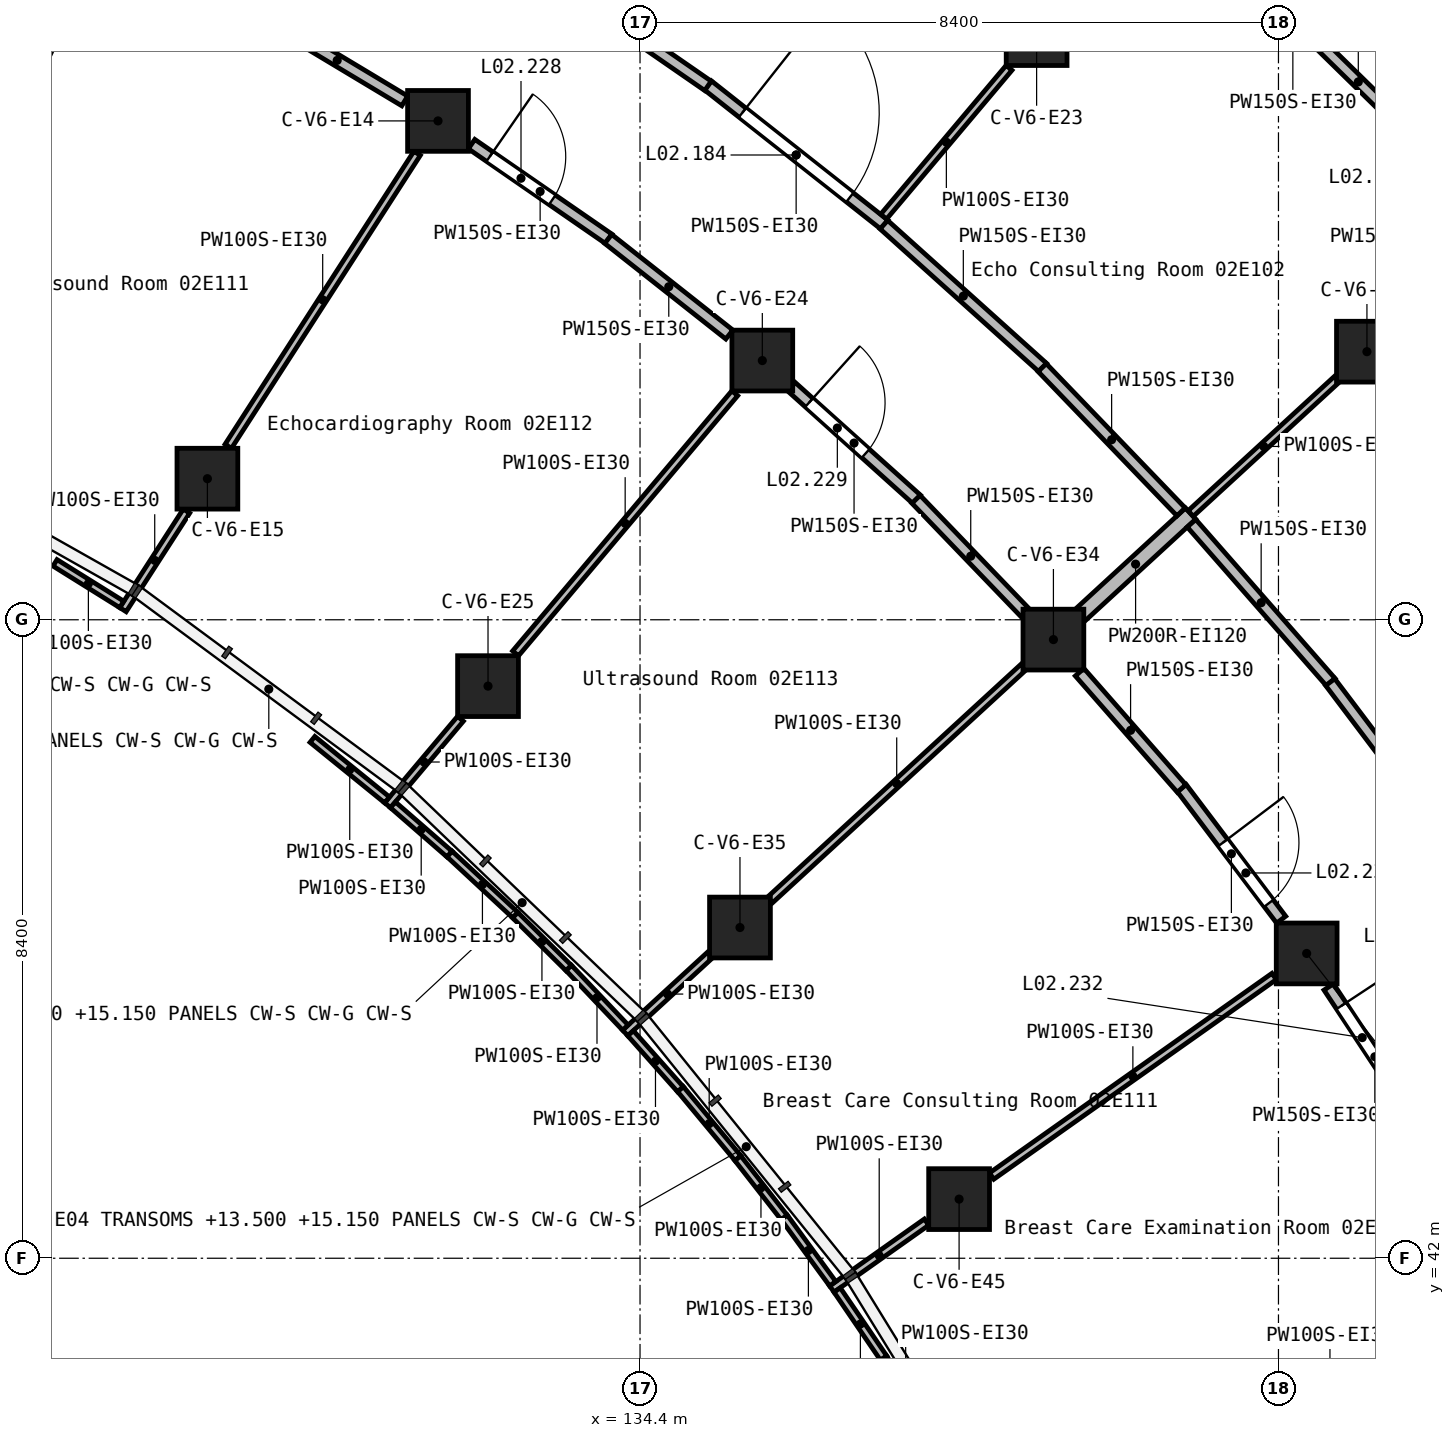
"""IFC4 building model, lengths in metres.
Left out: names, types, materials, properties, quantities, classifications, styles, units other than length and angle.
Written with IfcOpenShell. Run it as: python <this file> out.ifc"""

import sys

from ifc_helpers import new_model, si_unit, direction, frame, frame_2d, origin, origin_2d, place, context, subcontext, project, spatial, rectangle, extrude, element, fill, save


model = new_model("IFC4")
c1 = context("Model", 3, precision=1e-05, world=origin(), true_north=direction((0.0, 1.0)))
c2 = subcontext(c1, "Body", "Model", "MODEL_VIEW")
j1 = project(units=[si_unit("LENGTHUNIT", "METRE"), si_unit("PLANEANGLEUNIT", "RADIAN")], contexts=[c1])
p1 = place(None, origin())
s1 = spatial("IfcSite", under=j1, at=p1, CompositionType="ELEMENT")
p2 = place(p1, origin())
s2 = spatial("IfcBuilding", under=s1, at=p2, CompositionType="ELEMENT")
p3 = place(p2, frame((0.0, 0.0, 12.6)))
s3 = spatial("IfcBuildingStorey", under=s2, at=p3, CompositionType="ELEMENT", Elevation=12.6)
for number, where, z_axis, x_axis in (
    (1, (128.708, 52.256, 0.0), (0.0, 0.0, 1.0), (1.0, 0.0, 0.0)),
    (2, (131.742, 56.963, 0.0), (0.0, 0.0, 1.0), (1.0, 0.0, 0.0)),
    (3, (132.4, 49.527, 0.0), (0.0, 0.0, 1.0), (1.0, 0.0, 0.0)),
    (4, (135.715, 46.351, 0.0), (0.0, 0.0, 1.0), (1.0, 0.0, 0.0)),
    (5, (136.009, 53.81, 0.0), (0.0, 0.0, 1.0), (1.0, 0.0, 0.0)),
    (6, (138.598, 42.778, 0.0), (0.0, 0.0, 1.0), (1.0, 0.0, 0.0)),
    (7, (139.618, 58.092, 0.0), (0.0, 0.0, 1.0), (1.0, 0.0, 0.0)),
    (8, (139.839, 50.139, 0.0), (0.0, 0.0, 1.0), (1.0, 0.0, 0.0)),
    (9, (143.171, 46.01, 0.0), (0.0, 0.0, 1.0), (1.0, 0.0, 0.0)),
    (10, (143.964, 53.927, 0.0), (0.0, 0.0, 1.0), (1.0, 0.0, 0.0)),
):
    element("IfcColumn", number, at=place(p3, frame(where, z_axis=z_axis, x_axis=x_axis)), inside=s3, PredefinedType="COLUMN", context=c2, shape_type="SweptSolid", body=[
        extrude(rectangle(XDim=0.8, YDim=0.8, at=origin_2d()), origin(), (0.0, 0.0, 1.0), 4.2),
    ])
p4 = place(p3, frame((140.196, 50.467, 0.0), z_axis=(0.0, 0.0, 1.0), x_axis=(0.736519787736, 0.676415997943, 0.0)))
e11 = element("IfcWall", 11, at=p4, inside=s3, PredefinedType="SOLIDWALL", context=c2, shape_type="SweptSolid", body=[
    extrude(rectangle(XDim=1.966, YDim=0.2, at=frame_2d((0.983, 0.0))), origin(), (0.0, 0.0, 1.0), 3.85),
])
p5 = place(p3, frame((135.293, 57.43, 0.0), z_axis=(0.0, 0.0, 1.0), x_axis=(0.785039104315, -0.619446208073, 0.0)))
e12 = element("IfcWall", 12, at=p5, inside=s3, PredefinedType="PARTITIONING", context=c2, shape_type="SweptSolid", body=[
    extrude(rectangle(XDim=2.958, YDim=0.15, at=frame_2d((1.479, 0.0))), origin(), (0.0, 0.0, 1.0), 3.85),
])
p6 = place(p5, frame((0.579, 0.0, 0.0)))
e13 = element("IfcOpeningElement", 13, at=p6, cuts=e12, PredefinedType="OPENING", context=c2, shape_type="SweptSolid", body=[
    extrude(rectangle(XDim=1.8, YDim=2.1, at=frame_2d((0.9, 1.05))), frame((0.0, 0.085, 0.0), z_axis=(0.0, -1.0, 0.0), x_axis=(1.0, 0.0, 0.0)), (0.0, 0.0, 1.0), 0.17),
])
p7 = place(p3, frame((141.656, 51.669, 0.0), z_axis=(0.0, 0.0, 1.0), x_axis=(0.659076402407, -0.752075990702, 0.0)))
e14 = element("IfcWall", 14, at=p7, inside=s3, PredefinedType="PARTITIONING", context=c2, shape_type="SweptSolid", body=[
    extrude(rectangle(XDim=2.78, YDim=0.15, at=frame_2d((1.39, 0.0))), origin(), (0.0, 0.0, 1.0), 3.85),
])
p8 = place(p3, frame((137.608, 55.598, 0.0), z_axis=(0.0, 0.0, 1.0), x_axis=(0.743501368773, -0.668734412628, 0.0)))
e15 = element("IfcWall", 15, at=p8, inside=s3, PredefinedType="PARTITIONING", context=c2, shape_type="SweptSolid", body=[
    extrude(rectangle(XDim=2.812, YDim=0.15, at=frame_2d((1.406, 0.0))), origin(), (0.0, 0.0, 1.0), 3.85),
])
for number, where, z_axis, x_axis in (
    (16, (133.101, 58.94, 0.0), (0.0, 0.0, 1.0), (0.823, -0.569, 0.0)),
    (17, (143.481, 49.579, 0.0), (0.0, 0.0, 1.0), (0.603, -0.798, 0.0)),
):
    element("IfcWall", number, at=place(p3, frame(where, z_axis=z_axis, x_axis=x_axis)), inside=s3, PredefinedType="PARTITIONING", context=c2, shape_type="SweptSolid", body=[
        extrude(rectangle(XDim=2.666, YDim=0.15, at=frame_2d((1.333, 0.0))), origin(), (0.0, 0.0, 1.0), 3.85),
    ])
p9 = place(p3, frame((139.691, 53.718, 0.0), z_axis=(0.0, 0.0, 1.0), x_axis=(0.693447550136, -0.720507109757, 0.0)))
e18 = element("IfcWall", 18, at=p9, inside=s3, PredefinedType="PARTITIONING", context=c2, shape_type="SweptSolid", body=[
    extrude(rectangle(XDim=2.635, YDim=0.15, at=frame_2d((1.317, 0.0))), origin(), (0.0, 0.0, 1.0), 3.85),
])
p10 = place(p3, frame((136.393, 53.465, 0.0), z_axis=(0.0, 0.0, 1.0), x_axis=(0.743617683722, -0.668605070618, 0.0)))
e19 = element("IfcWall", 19, at=p10, inside=s3, PredefinedType="PARTITIONING", context=c2, shape_type="SweptSolid", body=[
    extrude(rectangle(XDim=2.213, YDim=0.15, at=frame_2d((1.106, 0.0))), origin(), (0.0, 0.0, 1.0), 3.85),
])
p11 = place(p10, frame((0.311, 0.0, 0.0)))
e20 = element("IfcOpeningElement", 20, at=p11, cuts=e19, PredefinedType="OPENING", context=c2, shape_type="SweptSolid", body=[
    extrude(rectangle(XDim=1.0, YDim=2.1, at=frame_2d((0.5, 1.05))), frame((0.0, 0.085, 0.0), z_axis=(0.0, -1.0, 0.0), x_axis=(1.0, 0.0, 0.0)), (0.0, 0.0, 1.0), 0.17),
])
p12 = place(p3, frame((132.184, 56.658, 0.0), z_axis=(0.0, 0.0, 1.0), x_axis=(0.82273696549, -0.568422277551, 0.0)))
e21 = element("IfcWall", 21, at=p12, inside=s3, PredefinedType="PARTITIONING", context=c2, shape_type="SweptSolid", body=[
    extrude(rectangle(XDim=2.193, YDim=0.15, at=frame_2d((1.096, 0.0))), origin(), (0.0, 0.0, 1.0), 3.85),
])
p13 = place(p12, frame((0.29, 0.0, 0.0)))
e22 = element("IfcOpeningElement", 22, at=p13, cuts=e21, PredefinedType="OPENING", context=c2, shape_type="SweptSolid", body=[
    extrude(rectangle(XDim=1.0, YDim=2.1, at=frame_2d((0.5, 1.05))), frame((0.0, 0.085, 0.0), z_axis=(0.0, -1.0, 0.0), x_axis=(1.0, 0.0, 0.0)), (0.0, 0.0, 1.0), 0.17),
])
p14 = place(p3, frame((141.526, 48.188, 0.0), z_axis=(0.0, 0.0, 1.0), x_axis=(0.60280129331, -0.797891346477, 0.0)))
e23 = element("IfcWall", 23, at=p14, inside=s3, PredefinedType="PARTITIONING", context=c2, shape_type="SweptSolid", body=[
    extrude(rectangle(XDim=2.172, YDim=0.15, at=frame_2d((1.086, 0.0))), origin(), (0.0, 0.0, 1.0), 3.85),
])
p15 = place(p14, frame((0.902, 0.0, 0.0)))
e24 = element("IfcOpeningElement", 24, at=p15, cuts=e23, PredefinedType="OPENING", context=c2, shape_type="SweptSolid", body=[
    extrude(rectangle(XDim=1.0, YDim=2.1, at=frame_2d((0.5, 1.05))), frame((0.0, 0.085, 0.0), z_axis=(0.0, -1.0, 0.0), x_axis=(1.0, 0.0, 0.0)), (0.0, 0.0, 1.0), 0.17),
])
p16 = place(p3, frame((143.462, 45.57, 0.0), z_axis=(0.0, 0.0, 1.0), x_axis=(0.550880835548, -0.834583911315, 0.0)))
e25 = element("IfcWall", 25, at=p16, inside=s3, PredefinedType="PARTITIONING", context=c2, shape_type="SweptSolid", body=[
    extrude(rectangle(XDim=2.201, YDim=0.15, at=frame_2d((1.101, 0.0))), origin(), (0.0, 0.0, 1.0), 3.85),
])
p17 = place(p16, frame((0.299, 0.0, 0.0)))
e26 = element("IfcOpeningElement", 26, at=p17, cuts=e25, PredefinedType="OPENING", context=c2, shape_type="SweptSolid", body=[
    extrude(rectangle(XDim=1.0, YDim=2.1, at=frame_2d((0.5, 1.05))), frame((0.0, 0.085, 0.0), z_axis=(0.0, -1.0, 0.0), x_axis=(1.0, 0.0, 0.0)), (0.0, 0.0, 1.0), 0.17),
])
p18 = place(p3, frame((133.981, 55.41, 0.0), z_axis=(0.0, 0.0, 1.0), x_axis=(0.784968928218, -0.619535133574, 0.0)))
e27 = element("IfcWall", 27, at=p18, inside=s3, PredefinedType="PARTITIONING", context=c2, shape_type="SweptSolid", body=[
    extrude(rectangle(XDim=2.031, YDim=0.15, at=frame_2d((1.015, 0.0))), origin(), (0.0, 0.0, 1.0), 3.85),
])
p19 = place(p3, frame((129.527, 58.293, 0.0), z_axis=(0.0, 0.0, 1.0), x_axis=(0.8573370195, -0.514755509922, 0.0)))
e28 = element("IfcWall", 28, at=p19, inside=s3, PredefinedType="PARTITIONING", context=c2, shape_type="SweptSolid", body=[
    extrude(rectangle(XDim=2.073, YDim=0.15, at=frame_2d((1.037, 0.0))), origin(), (0.0, 0.0, 1.0), 3.85),
])
p20 = place(p3, frame((140.184, 49.71, 0.0), z_axis=(0.0, 0.0, 1.0), x_axis=(0.659209376091, -0.751959439381, 0.0)))
e29 = element("IfcWall", 29, at=p20, inside=s3, PredefinedType="PARTITIONING", context=c2, shape_type="SweptSolid", body=[
    extrude(rectangle(XDim=2.035, YDim=0.15, at=frame_2d((1.017, 0.0))), origin(), (0.0, 0.0, 1.0), 3.85),
])
p21 = place(p3, frame((138.031, 51.985, 0.0), z_axis=(0.0, 0.0, 1.0), x_axis=(0.693216793474, -0.7207291289, 0.0)))
e30 = element("IfcWall", 30, at=p21, inside=s3, PredefinedType="PARTITIONING", context=c2, shape_type="SweptSolid", body=[
    extrude(rectangle(XDim=2.076, YDim=0.15, at=frame_2d((1.038, 0.0))), origin(), (0.0, 0.0, 1.0), 3.85),
])
p22 = place(p3, frame((143.292, 58.022, 0.0), z_axis=(0.0, 0.0, 1.0), x_axis=(0.714415993139, -0.699721222164, 0.0)))
e31 = element("IfcWall", 31, at=p22, inside=s3, PredefinedType="PARTITIONING", context=c2, shape_type="SweptSolid", body=[
    extrude(rectangle(XDim=1.562, YDim=0.15, at=frame_2d((0.781, 0.0))), origin(), (0.0, 0.0, 1.0), 3.85),
])
p23 = place(p3, frame((131.079, 47.96, 0.0), z_axis=(0.0, 0.0, 1.0), x_axis=(0.644403525256, 0.764685619479, 0.0)))
e32 = element("IfcWall", 32, at=p23, inside=s3, PredefinedType="PARTITIONING", context=c2, shape_type="SweptSolid", body=[
    extrude(rectangle(XDim=1.488, YDim=0.1, at=frame_2d((0.744, 0.0))), origin(), (0.0, 0.0, 1.0), 3.85),
])
p24 = place(p3, frame((132.762, 49.958, 0.0), z_axis=(0.0, 0.0, 1.0), x_axis=(0.644429680937, 0.76466357722, 0.0)))
e33 = element("IfcWall", 33, at=p24, inside=s3, PredefinedType="PARTITIONING", context=c2, shape_type="SweptSolid", body=[
    extrude(rectangle(XDim=4.475, YDim=0.1, at=frame_2d((2.238, 0.0))), origin(), (0.0, 0.0, 1.0), 3.85),
])
p25 = place(p3, frame((127.597, 50.533, 0.0), z_axis=(0.0, 0.0, 1.0), x_axis=(0.541741092646, 0.840545411348, 0.0)))
e34 = element("IfcWall", 34, at=p25, inside=s3, PredefinedType="PARTITIONING", context=c2, shape_type="SweptSolid", body=[
    extrude(rectangle(XDim=1.543, YDim=0.1, at=frame_2d((0.771, 0.0))), origin(), (0.0, 0.0, 1.0), 3.85),
])
p26 = place(p3, frame((128.983, 52.683, 0.0), z_axis=(0.0, 0.0, 1.0), x_axis=(0.541806664818, 0.840503145716, 0.0)))
e35 = element("IfcWall", 35, at=p26, inside=s3, PredefinedType="PARTITIONING", context=c2, shape_type="SweptSolid", body=[
    extrude(rectangle(XDim=4.585, YDim=0.1, at=frame_2d((2.293, 0.0))), origin(), (0.0, 0.0, 1.0), 3.85),
])
p27 = place(p3, frame((141.427, 39.093, 0.0), z_axis=(0.0, 0.0, 1.0), x_axis=(0.88344099274, 0.46854243388, 0.0)))
e36 = element("IfcWall", 36, at=p27, inside=s3, PredefinedType="PARTITIONING", context=c2, shape_type="SweptSolid", body=[
    extrude(rectangle(XDim=4.642, YDim=0.1, at=frame_2d((2.321, 0.0))), origin(), (0.0, 0.0, 1.0), 3.85),
])
p28 = place(p3, frame((136.924, 41.595, 0.0), z_axis=(0.0, 0.0, 1.0), x_axis=(0.816643847366, 0.577141946629, 0.0)))
e37 = element("IfcWall", 37, at=p28, inside=s3, PredefinedType="PARTITIONING", context=c2, shape_type="SweptSolid", body=[
    extrude(rectangle(XDim=1.525, YDim=0.1, at=frame_2d((0.762, 0.0))), origin(), (0.0, 0.0, 1.0), 3.85),
])
p29 = place(p3, frame((139.026, 43.081, 0.0), z_axis=(0.0, 0.0, 1.0), x_axis=(0.816637661001, 0.577150700108, 0.0)))
e38 = element("IfcWall", 38, at=p29, inside=s3, PredefinedType="PARTITIONING", context=c2, shape_type="SweptSolid", body=[
    extrude(rectangle(XDim=4.551, YDim=0.1, at=frame_2d((2.275, 0.0))), origin(), (0.0, 0.0, 1.0), 3.85),
])
p30 = place(p3, frame((134.205, 44.964, 0.0), z_axis=(0.0, 0.0, 1.0), x_axis=(0.736497059378, 0.676440745023, 0.0)))
e39 = element("IfcWall", 39, at=p30, inside=s3, PredefinedType="PARTITIONING", context=c2, shape_type="SweptSolid", body=[
    extrude(rectangle(XDim=1.512, YDim=0.1, at=frame_2d((0.756, 0.0))), origin(), (0.0, 0.0, 1.0), 3.85),
])
p31 = place(p3, frame((136.111, 46.715, 0.0), z_axis=(0.0, 0.0, 1.0), x_axis=(0.736475017651, 0.676464742892, 0.0)))
e40 = element("IfcWall", 40, at=p31, inside=s3, PredefinedType="PARTITIONING", context=c2, shape_type="SweptSolid", body=[
    extrude(rectangle(XDim=4.524, YDim=0.1, at=frame_2d((2.262, 0.0))), origin(), (0.0, 0.0, 1.0), 3.85),
])
p32 = place(p3, frame((141.645, 51.798, 0.0), z_axis=(0.0, 0.0, 1.0), x_axis=(0.73658314114, 0.676347008709, 0.0)))
e41 = element("IfcWall", 41, at=p32, inside=s3, PredefinedType="PARTITIONING", context=c2, shape_type="SweptSolid", body=[
    extrude(rectangle(XDim=2.61, YDim=0.1, at=frame_2d((1.305, 0.0))), origin(), (0.0, 0.0, 1.0), 3.85),
])
p33 = place(p3, frame((137.605, 55.704, 0.0), z_axis=(0.0, 0.0, 1.0), x_axis=(0.644432238292, 0.764661421971, 0.0)))
e42 = element("IfcWall", 42, at=p33, inside=s3, PredefinedType="PARTITIONING", context=c2, shape_type="SweptSolid", body=[
    extrude(rectangle(XDim=2.561, YDim=0.1, at=frame_2d((1.28, 0.0))), origin(), (0.0, 0.0, 1.0), 3.85),
])
p34 = place(p3, frame((130.09, 48.826, 0.0), z_axis=(0.0, 0.0, 1.0), x_axis=(0.776627985422, -0.629959500492, 0.0)))
e43 = element("IfcWall", 43, at=p34, inside=s3, PredefinedType="PARTITIONING", context=c2, shape_type="SweptSolid", body=[
    extrude(rectangle(XDim=1.263, YDim=0.1, at=frame_2d((0.632, 0.0))), origin(), (0.0, 0.0, 1.0), 3.85),
])
p35 = place(p3, frame((126.703, 51.149, 0.0), z_axis=(0.0, 0.0, 1.0), x_axis=(0.848687049906, -0.528895350067, 0.0)))
e44 = element("IfcWall", 44, at=p35, inside=s3, PredefinedType="PARTITIONING", context=c2, shape_type="SweptSolid", body=[
    extrude(rectangle(XDim=1.034, YDim=0.1, at=frame_2d((0.517, 0.0))), origin(), (0.0, 0.0, 1.0), 3.85),
])
for number, where, z_axis, x_axis in (
    (45, (133.461, 45.821, 0.0), (0.0, 0.0, 1.0), (0.688, -0.725, 0.0)),
    (46, (136.994, 41.582, 0.0), (0.0, 0.0, 1.0), (0.564, -0.826, 0.0)),
):
    element("IfcWall", number, at=place(p3, frame(where, z_axis=z_axis, x_axis=x_axis)), inside=s3, PredefinedType="PARTITIONING", context=c2, shape_type="SweptSolid", body=[
        extrude(rectangle(XDim=1.084, YDim=0.1, at=frame_2d((0.542, 0.0))), origin(), (0.0, 0.0, 1.0), 3.85),
    ])
p36 = place(p3, frame((134.931, 44.226, 0.0), z_axis=(0.0, 0.0, 1.0), x_axis=(0.639778970268, -0.768558956231, 0.0)))
e47 = element("IfcWall", 47, at=p36, inside=s3, PredefinedType="PARTITIONING", context=c2, shape_type="SweptSolid", body=[
    extrude(rectangle(XDim=1.185, YDim=0.1, at=frame_2d((0.592, 0.0))), origin(), (0.0, 0.0, 1.0), 3.85),
])
p37 = place(p3, frame((137.603, 40.687, 0.0), z_axis=(0.0, 0.0, 1.0), x_axis=(0.53747146193, -0.843281938388, 0.0)))
e48 = element("IfcWall", 48, at=p37, inside=s3, PredefinedType="PARTITIONING", context=c2, shape_type="SweptSolid", body=[
    extrude(rectangle(XDim=1.086, YDim=0.1, at=frame_2d((0.543, 0.0))), origin(), (0.0, 0.0, 1.0), 3.85),
])
p38 = place(p3, frame((136.295, 42.54, 0.0), z_axis=(0.0, 0.0, 1.0), x_axis=(0.590044821415, -0.807370490371, 0.0)))
e49 = element("IfcWall", 49, at=p38, inside=s3, PredefinedType="PARTITIONING", context=c2, shape_type="SweptSolid", body=[
    extrude(rectangle(XDim=1.084, YDim=0.1, at=frame_2d((0.542, 0.0))), origin(), (0.0, 0.0, 1.0), 3.85),
])
p39 = place(p3, frame((131.892, 47.32, 0.0), z_axis=(0.0, 0.0, 1.0), x_axis=(0.732793491626, -0.680451099367, 0.0)))
e50 = element("IfcWall", 50, at=p39, inside=s3, PredefinedType="PARTITIONING", context=c2, shape_type="SweptSolid", body=[
    extrude(rectangle(XDim=1.185, YDim=0.1, at=frame_2d((0.592, 0.0))), origin(), (0.0, 0.0, 1.0), 3.85),
])
p40 = place(p3, frame((132.758, 46.514, 0.0), z_axis=(0.0, 0.0, 1.0), x_axis=(0.710804317615, -0.703389808043, 0.0)))
e51 = element("IfcWall", 51, at=p40, inside=s3, PredefinedType="PARTITIONING", context=c2, shape_type="SweptSolid", body=[
    extrude(rectangle(XDim=0.988, YDim=0.1, at=frame_2d((0.494, 0.0))), origin(), (0.0, 0.0, 1.0), 3.85),
])
p41 = place(p3, frame((131.149, 47.965, 0.0), z_axis=(0.0, 0.0, 1.0), x_axis=(0.75424788942, -0.656589766373, 0.0)))
e52 = element("IfcWall", 52, at=p41, inside=s3, PredefinedType="PARTITIONING", context=c2, shape_type="SweptSolid", body=[
    extrude(rectangle(XDim=0.985, YDim=0.1, at=frame_2d((0.492, 0.0))), origin(), (0.0, 0.0, 1.0), 3.85),
])
p42 = place(p3, frame((134.276, 44.96, 0.0), z_axis=(0.0, 0.0, 1.0), x_axis=(0.66477897218, -0.747040104779, 0.0)))
e53 = element("IfcWall", 53, at=p42, inside=s3, PredefinedType="PARTITIONING", context=c2, shape_type="SweptSolid", body=[
    extrude(rectangle(XDim=0.985, YDim=0.1, at=frame_2d((0.493, 0.0))), origin(), (0.0, 0.0, 1.0), 3.85),
])
p43 = place(p3, frame((135.687, 43.316, 0.0), z_axis=(0.0, 0.0, 1.0), x_axis=(0.615941497949, -0.787791895811, 0.0)))
e54 = element("IfcWall", 54, at=p43, inside=s3, PredefinedType="PARTITIONING", context=c2, shape_type="SweptSolid", body=[
    extrude(rectangle(XDim=0.987, YDim=0.1, at=frame_2d((0.494, 0.0))), origin(), (0.0, 0.0, 1.0), 3.85),
])
p44 = place(p6, frame((1.8, 0.0, 0.0), z_axis=(0.0, 0.0, 1.0), x_axis=(-1.0, 0.0, 0.0)))
e55 = element("IfcDoor", 55, at=p44, inside=s3, OperationType="DOUBLE_DOOR_SINGLE_SWING", PredefinedType="DOOR", context=c2, shape_type="SweptSolid", body=[
    extrude(rectangle(XDim=1.8, YDim=2.1, at=frame_2d((0.9, 1.05))), frame((0.0, 0.025, 0.0), z_axis=(0.0, -1.0, 0.0), x_axis=(1.0, 0.0, 0.0)), (0.0, 0.0, 1.0), 0.05),
])
fill(e13, e55)
p45 = place(p13, frame((1.0, 0.0, 0.0), z_axis=(0.0, 0.0, 1.0), x_axis=(-1.0, 0.0, 0.0)))
e56 = element("IfcDoor", 56, at=p45, inside=s3, OperationType="SINGLE_SWING_RIGHT", PredefinedType="DOOR", context=c2, shape_type="SweptSolid", body=[
    extrude(rectangle(XDim=1.0, YDim=2.1, at=frame_2d((0.5, 1.05))), frame((0.0, 0.025, 0.0), z_axis=(0.0, -1.0, 0.0), x_axis=(1.0, 0.0, 0.0)), (0.0, 0.0, 1.0), 0.05),
])
fill(e22, e56)
p46 = place(p11, frame((1.0, 0.0, 0.0), z_axis=(0.0, 0.0, 1.0), x_axis=(-1.0, 0.0, 0.0)))
e57 = element("IfcDoor", 57, at=p46, inside=s3, OperationType="SINGLE_SWING_RIGHT", PredefinedType="DOOR", context=c2, shape_type="SweptSolid", body=[
    extrude(rectangle(XDim=1.0, YDim=2.1, at=frame_2d((0.5, 1.05))), frame((0.0, 0.025, 0.0), z_axis=(0.0, -1.0, 0.0), x_axis=(1.0, 0.0, 0.0)), (0.0, 0.0, 1.0), 0.05),
])
fill(e20, e57)
p47 = place(p15, frame((1.0, 0.0, 0.0), z_axis=(0.0, 0.0, 1.0), x_axis=(-1.0, 0.0, 0.0)))
e58 = element("IfcDoor", 58, at=p47, inside=s3, OperationType="SINGLE_SWING_LEFT", PredefinedType="DOOR", context=c2, shape_type="SweptSolid", body=[
    extrude(rectangle(XDim=1.0, YDim=2.1, at=frame_2d((0.5, 1.05))), frame((0.0, 0.025, 0.0), z_axis=(0.0, -1.0, 0.0), x_axis=(1.0, 0.0, 0.0)), (0.0, 0.0, 1.0), 0.05),
])
fill(e24, e58)
p48 = place(p17, frame((1.0, 0.0, 0.0), z_axis=(0.0, 0.0, 1.0), x_axis=(-1.0, 0.0, 0.0)))
e59 = element("IfcDoor", 59, at=p48, inside=s3, OperationType="SINGLE_SWING_RIGHT", PredefinedType="DOOR", context=c2, shape_type="SweptSolid", body=[
    extrude(rectangle(XDim=1.0, YDim=2.1, at=frame_2d((0.5, 1.05))), frame((0.0, 0.025, 0.0), z_axis=(0.0, -1.0, 0.0), x_axis=(1.0, 0.0, 0.0)), (0.0, 0.0, 1.0), 0.05),
])
fill(e26, e59)
save(model, sys.argv[1])
